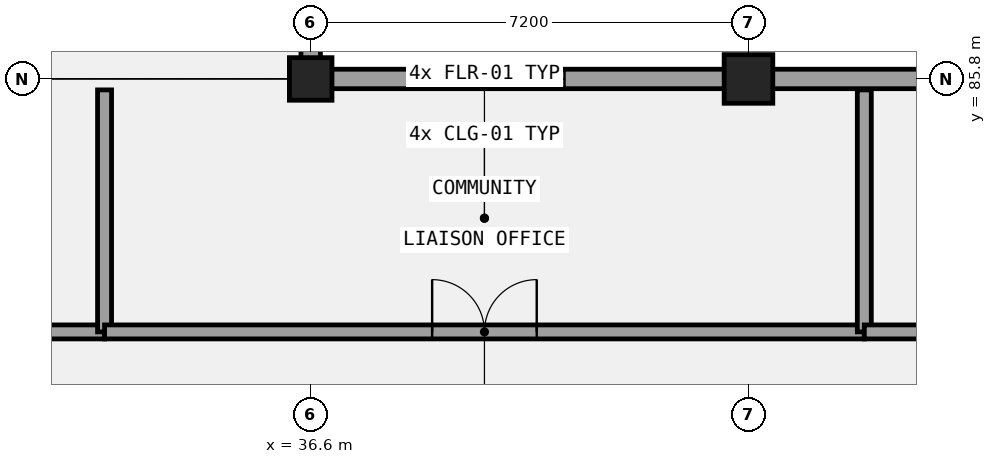
"""IFC4 building model, lengths in metres.
Left out: names, types, materials, properties, quantities, classifications, styles, units other than length and angle.
Written with IfcOpenShell. Run it as: python <this file> out.ifc"""

import sys

from ifc_helpers import new_model, si_unit, direction, frame, frame_2d, origin, origin_2d, place, context, subcontext, project, spatial, rectangle, extrude, element, fill, save


model = new_model("IFC4")
c1 = context("Model", 3, precision=1e-05, world=origin(), true_north=direction((0.0, 1.0)))
c2 = subcontext(c1, "Body", "Model", "MODEL_VIEW")
j1 = project(units=[si_unit("LENGTHUNIT", "METRE"), si_unit("PLANEANGLEUNIT", "RADIAN")], contexts=[c1])
p1 = place(None, origin())
s1 = spatial("IfcSite", under=j1, at=p1, CompositionType="ELEMENT")
p2 = place(p1, origin())
s2 = spatial("IfcBuilding", under=s1, at=p2, CompositionType="ELEMENT")
p3 = place(p2, origin())
s3 = spatial("IfcBuildingStorey", under=s2, at=p3, CompositionType="ELEMENT", Elevation=0.0)
p4 = place(p3, frame((36.6, 85.8, 0.0), z_axis=(0.0, 0.0, 1.0), x_axis=(1.0, 0.0, 0.0)))
e1 = element("IfcColumn", 1, at=p4, inside=s3, PredefinedType="COLUMN", context=c2, shape_type="SweptSolid", body=[
    extrude(rectangle(XDim=0.7, YDim=0.7, at=origin_2d()), origin(), (0.0, 0.0, 1.0), 5.4),
])
p5 = place(p3, frame((43.8, 85.8, 0.0), z_axis=(0.0, 0.0, 1.0), x_axis=(1.0, 0.0, 0.0)))
e2 = element("IfcColumn", 2, at=p5, inside=s3, PredefinedType="COLUMN", context=c2, shape_type="SweptSolid", body=[
    extrude(rectangle(XDim=0.8, YDim=0.8, at=origin_2d()), origin(), (0.0, 0.0, 1.0), 5.4),
])
p6 = place(p3, frame((108.76, 85.8, 0.0), z_axis=(0.0, 0.0, 1.0), x_axis=(-1.0, 0.0, 0.0)))
e3 = element("IfcWall", 3, at=p6, inside=s3, PredefinedType="SOLIDWALL", context=c2, shape_type="SweptSolid", body=[
    extrude(rectangle(XDim=72.32, YDim=0.32, at=frame_2d((36.16, 0.0))), origin(), (0.0, 0.0, 1.0), 4.12),
])
p7 = place(p6, frame((67.985, 0.0, 1.0)))
e4 = element("IfcOpeningElement", 4, at=p7, cuts=e3, PredefinedType="OPENING", context=c2, shape_type="SweptSolid", body=[
    extrude(rectangle(XDim=1.15, YDim=1.4, at=frame_2d((0.575, 0.7))), frame((0.0, 0.17, 0.0), z_axis=(0.0, -1.0, 0.0), x_axis=(1.0, 0.0, 0.0)), (0.0, 0.0, 1.0), 0.34),
])
p8 = place(p6, frame((60.785, 0.0, 1.0)))
e5 = element("IfcOpeningElement", 5, at=p8, cuts=e3, PredefinedType="OPENING", context=c2, shape_type="SweptSolid", body=[
    extrude(rectangle(XDim=1.15, YDim=1.4, at=frame_2d((0.575, 0.7))), frame((0.0, 0.17, 0.0), z_axis=(0.0, -1.0, 0.0), x_axis=(1.0, 0.0, 0.0)), (0.0, 0.0, 1.0), 0.34),
])
p9 = place(p6, frame((53.585, 0.0, 1.0)))
e6 = element("IfcOpeningElement", 6, at=p9, cuts=e3, PredefinedType="OPENING", context=c2, shape_type="SweptSolid", body=[
    extrude(rectangle(XDim=1.15, YDim=1.4, at=frame_2d((0.575, 0.7))), frame((0.0, 0.17, 0.0), z_axis=(0.0, -1.0, 0.0), x_axis=(1.0, 0.0, 0.0)), (0.0, 0.0, 1.0), 0.34),
])
p10 = place(p6, frame((46.385, 0.0, 1.0)))
e7 = element("IfcOpeningElement", 7, at=p10, cuts=e3, PredefinedType="OPENING", context=c2, shape_type="SweptSolid", body=[
    extrude(rectangle(XDim=1.15, YDim=1.4, at=frame_2d((0.575, 0.7))), frame((0.0, 0.17, 0.0), z_axis=(0.0, -1.0, 0.0), x_axis=(1.0, 0.0, 0.0)), (0.0, 0.0, 1.0), 0.34),
])
p11 = place(p6, frame((39.185, 0.0, 1.0)))
e8 = element("IfcOpeningElement", 8, at=p11, cuts=e3, PredefinedType="OPENING", context=c2, shape_type="SweptSolid", body=[
    extrude(rectangle(XDim=1.15, YDim=1.4, at=frame_2d((0.575, 0.7))), frame((0.0, 0.17, 0.0), z_axis=(0.0, -1.0, 0.0), x_axis=(1.0, 0.0, 0.0)), (0.0, 0.0, 1.0), 0.34),
])
p12 = place(p6, frame((31.985, 0.0, 1.0)))
e9 = element("IfcOpeningElement", 9, at=p12, cuts=e3, PredefinedType="OPENING", context=c2, shape_type="SweptSolid", body=[
    extrude(rectangle(XDim=1.15, YDim=1.4, at=frame_2d((0.575, 0.7))), frame((0.0, 0.17, 0.0), z_axis=(0.0, -1.0, 0.0), x_axis=(1.0, 0.0, 0.0)), (0.0, 0.0, 1.0), 0.34),
])
p13 = place(p6, frame((24.785, 0.0, 1.0)))
e10 = element("IfcOpeningElement", 10, at=p13, cuts=e3, PredefinedType="OPENING", context=c2, shape_type="SweptSolid", body=[
    extrude(rectangle(XDim=1.15, YDim=1.4, at=frame_2d((0.575, 0.7))), frame((0.0, 0.17, 0.0), z_axis=(0.0, -1.0, 0.0), x_axis=(1.0, 0.0, 0.0)), (0.0, 0.0, 1.0), 0.34),
])
p14 = place(p6, frame((17.585, 0.0, 1.0)))
e11 = element("IfcOpeningElement", 11, at=p14, cuts=e3, PredefinedType="OPENING", context=c2, shape_type="SweptSolid", body=[
    extrude(rectangle(XDim=1.15, YDim=1.4, at=frame_2d((0.575, 0.7))), frame((0.0, 0.17, 0.0), z_axis=(0.0, -1.0, 0.0), x_axis=(1.0, 0.0, 0.0)), (0.0, 0.0, 1.0), 0.34),
])
p15 = place(p6, frame((10.385, 0.0, 1.0)))
e12 = element("IfcOpeningElement", 12, at=p15, cuts=e3, PredefinedType="OPENING", context=c2, shape_type="SweptSolid", body=[
    extrude(rectangle(XDim=1.15, YDim=1.4, at=frame_2d((0.575, 0.7))), frame((0.0, 0.17, 0.0), z_axis=(0.0, -1.0, 0.0), x_axis=(1.0, 0.0, 0.0)), (0.0, 0.0, 1.0), 0.34),
])
p16 = place(p6, frame((3.185, 0.0, 1.0)))
e13 = element("IfcOpeningElement", 13, at=p16, cuts=e3, PredefinedType="OPENING", context=c2, shape_type="SweptSolid", body=[
    extrude(rectangle(XDim=1.15, YDim=1.4, at=frame_2d((0.575, 0.7))), frame((0.0, 0.17, 0.0), z_axis=(0.0, -1.0, 0.0), x_axis=(1.0, 0.0, 0.0)), (0.0, 0.0, 1.0), 0.34),
])
p17 = place(p3, frame((36.6, 85.96, 0.0), z_axis=(0.0, 0.0, 1.0), x_axis=(0.0, 1.0, 0.0)))
e14 = element("IfcWall", 14, at=p17, inside=s3, PredefinedType="SOLIDWALL", context=c2, shape_type="SweptSolid", body=[
    extrude(rectangle(XDim=21.28, YDim=0.32, at=frame_2d((10.64, 0.0))), origin(), (0.0, 0.0, 1.0), 4.27),
])
p18 = place(p17, frame((9.74, 0.0, 0.0)))
e15 = element("IfcOpeningElement", 15, at=p18, cuts=e14, PredefinedType="OPENING", context=c2, shape_type="SweptSolid", body=[
    extrude(rectangle(XDim=1.8, YDim=2.4, at=frame_2d((0.9, 1.2))), frame((0.0, 0.17, 0.0), z_axis=(0.0, -1.0, 0.0), x_axis=(1.0, 0.0, 0.0)), (0.0, 0.0, 1.0), 0.34),
])
p19 = place(p17, frame((2.945, 0.0, 1.0)))
e16 = element("IfcOpeningElement", 16, at=p19, cuts=e14, PredefinedType="OPENING", context=c2, shape_type="SweptSolid", body=[
    extrude(rectangle(XDim=1.15, YDim=1.65, at=frame_2d((0.575, 0.825))), frame((0.0, 0.17, 0.0), z_axis=(0.0, -1.0, 0.0), x_axis=(1.0, 0.0, 0.0)), (0.0, 0.0, 1.0), 0.34),
])
p20 = place(p17, frame((17.185, 0.0, 1.0)))
e17 = element("IfcOpeningElement", 17, at=p20, cuts=e14, PredefinedType="OPENING", context=c2, shape_type="SweptSolid", body=[
    extrude(rectangle(XDim=1.15, YDim=1.65, at=frame_2d((0.575, 0.825))), frame((0.0, 0.17, 0.0), z_axis=(0.0, -1.0, 0.0), x_axis=(1.0, 0.0, 0.0)), (0.0, 0.0, 1.0), 0.34),
])
p21 = place(p3, frame((20.715, 81.64, 0.0), z_axis=(0.0, 0.0, 1.0), x_axis=(1.0, 0.0, 0.0)))
e18 = element("IfcWall", 18, at=p21, inside=s3, PredefinedType="PARTITIONING", context=c2, shape_type="SweptSolid", body=[
    extrude(rectangle(XDim=12.495, YDim=0.23, at=frame_2d((6.248, 0.0))), origin(), (0.0, 0.0, 1.0), 5.12),
])
p22 = place(p21, frame((5.387, 0.0, 0.0)))
e19 = element("IfcOpeningElement", 19, at=p22, cuts=e18, PredefinedType="OPENING", context=c2, shape_type="SweptSolid", body=[
    extrude(rectangle(XDim=1.72, YDim=2.1, at=frame_2d((0.86, 1.05))), frame((0.0, 0.125, 0.0), z_axis=(0.0, -1.0, 0.0), x_axis=(1.0, 0.0, 0.0)), (0.0, 0.0, 1.0), 0.25),
])
p23 = place(p3, frame((33.21, 81.64, 0.0), z_axis=(0.0, 0.0, 1.0), x_axis=(0.0, 1.0, 0.0)))
e20 = element("IfcWall", 20, at=p23, inside=s3, PredefinedType="PARTITIONING", context=c2, shape_type="SweptSolid", body=[
    extrude(rectangle(XDim=3.98, YDim=0.23, at=frame_2d((1.99, 0.0))), origin(), (0.0, 0.0, 1.0), 5.12),
])
p24 = place(p3, frame((33.21, 81.64, 0.0), z_axis=(0.0, 0.0, 1.0), x_axis=(1.0, 0.0, 0.0)))
e21 = element("IfcWall", 21, at=p24, inside=s3, PredefinedType="PARTITIONING", context=c2, shape_type="SweptSolid", body=[
    extrude(rectangle(XDim=12.495, YDim=0.23, at=frame_2d((6.248, 0.0))), origin(), (0.0, 0.0, 1.0), 5.12),
])
p25 = place(p24, frame((5.387, 0.0, 0.0)))
e22 = element("IfcOpeningElement", 22, at=p25, cuts=e21, PredefinedType="OPENING", context=c2, shape_type="SweptSolid", body=[
    extrude(rectangle(XDim=1.72, YDim=2.22, at=frame_2d((0.86, 1.11))), frame((0.0, 0.125, 0.0), z_axis=(0.0, -1.0, 0.0), x_axis=(1.0, 0.0, 0.0)), (0.0, 0.0, 1.0), 0.25),
])
p26 = place(p3, frame((45.705, 81.64, 0.0), z_axis=(0.0, 0.0, 1.0), x_axis=(0.0, 1.0, 0.0)))
e23 = element("IfcWall", 23, at=p26, inside=s3, PredefinedType="PARTITIONING", context=c2, shape_type="SweptSolid", body=[
    extrude(rectangle(XDim=3.98, YDim=0.23, at=frame_2d((1.99, 0.0))), origin(), (0.0, 0.0, 1.0), 5.12),
])
p27 = place(p3, frame((45.705, 81.64, 0.0), z_axis=(0.0, 0.0, 1.0), x_axis=(1.0, 0.0, 0.0)))
e24 = element("IfcWall", 24, at=p27, inside=s3, PredefinedType="PARTITIONING", context=c2, shape_type="SweptSolid", body=[
    extrude(rectangle(XDim=12.495, YDim=0.23, at=frame_2d((6.248, 0.0))), origin(), (0.0, 0.0, 1.0), 5.12),
])
p28 = place(p27, frame((5.387, 0.0, 0.0)))
e25 = element("IfcOpeningElement", 25, at=p28, cuts=e24, PredefinedType="OPENING", context=c2, shape_type="SweptSolid", body=[
    extrude(rectangle(XDim=1.72, YDim=2.35, at=frame_2d((0.86, 1.175))), frame((0.0, 0.125, 0.0), z_axis=(0.0, -1.0, 0.0), x_axis=(1.0, 0.0, 0.0)), (0.0, 0.0, 1.0), 0.25),
])
p29 = place(p7, origin())
e26 = element("IfcWindow", 26, at=p29, inside=s3, PartitioningType="SINGLE_PANEL", PredefinedType="WINDOW", context=c2, shape_type="SweptSolid", body=[
    extrude(rectangle(XDim=1.15, YDim=1.4, at=frame_2d((0.575, 0.7))), frame((0.0, 0.03, 0.0), z_axis=(0.0, -1.0, 0.0), x_axis=(1.0, 0.0, 0.0)), (0.0, 0.0, 1.0), 0.06),
])
fill(e4, e26)
p30 = place(p25, origin())
e27 = element("IfcDoor", 27, at=p30, inside=s3, OperationType="DOUBLE_DOOR_SINGLE_SWING", PredefinedType="DOOR", context=c2, shape_type="SweptSolid", body=[
    extrude(rectangle(XDim=1.72, YDim=2.22, at=frame_2d((0.86, 1.11))), frame((0.0, 0.025, 0.0), z_axis=(0.0, -1.0, 0.0), x_axis=(1.0, 0.0, 0.0)), (0.0, 0.0, 1.0), 0.05),
])
fill(e22, e27)
save(model, sys.argv[1])
